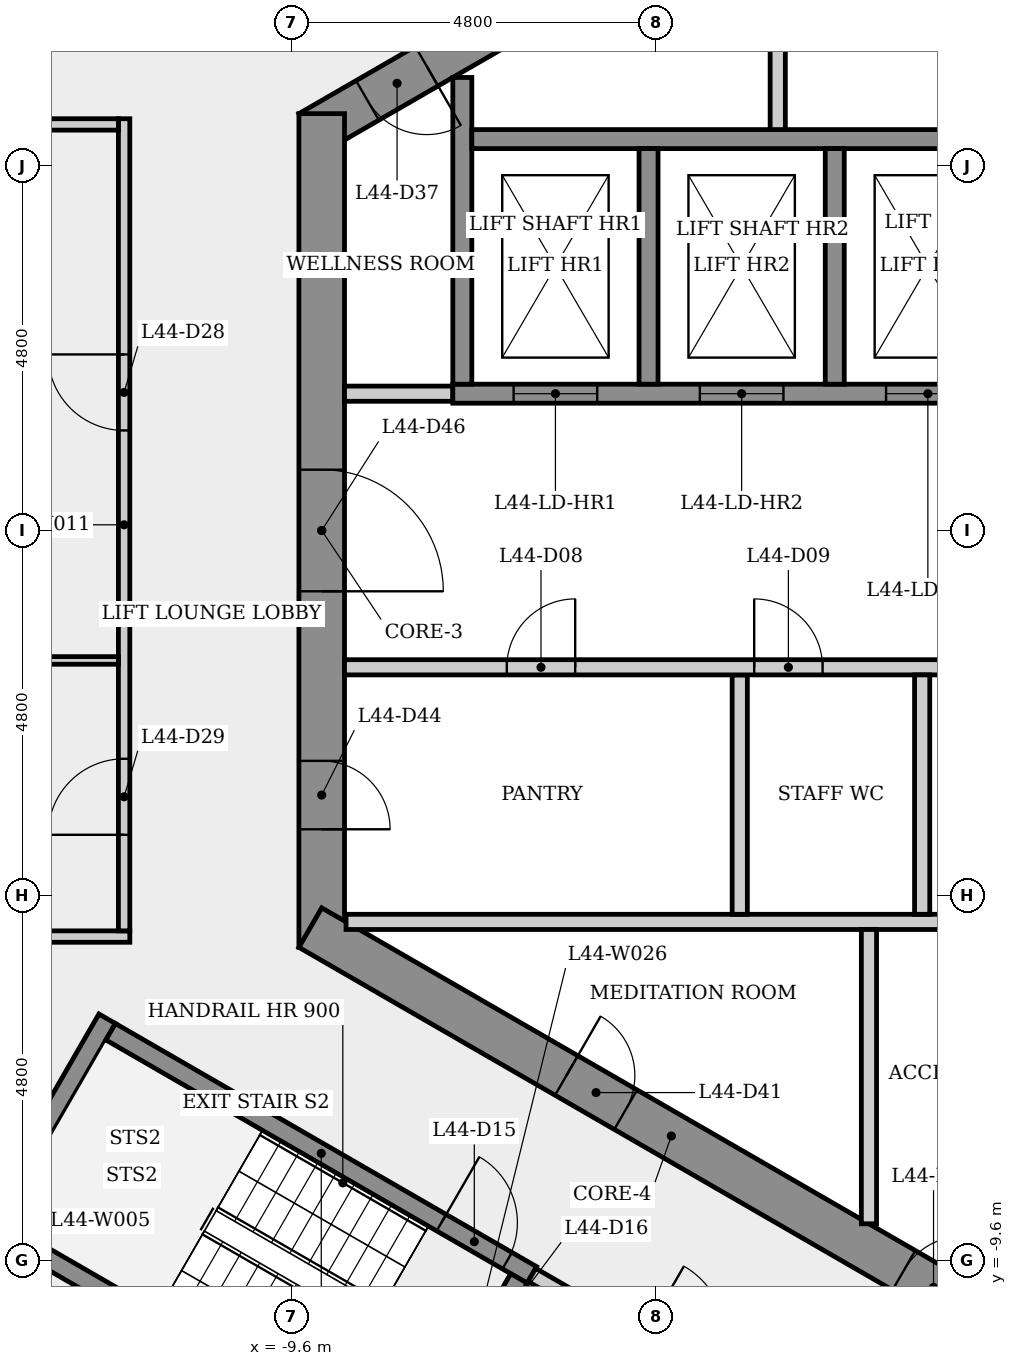
"""IFC4 building model, lengths in metres.
Left out: names, types, materials, properties, quantities, classifications, styles, units other than length and angle.
Written with IfcOpenShell. Run it as: python <this file> out.ifc"""

import sys

from ifc_helpers import new_model, si_unit, direction, frame, frame_2d, origin, place, context, subcontext, project, spatial, rectangle, extrude, element, fill, save


model = new_model("IFC4")
c1 = context("Model", 3, precision=1e-05, world=origin(), true_north=direction((0.0, 1.0)))
c2 = subcontext(c1, "Body", "Model", "MODEL_VIEW")
j1 = project(units=[si_unit("LENGTHUNIT", "METRE"), si_unit("PLANEANGLEUNIT", "RADIAN")], contexts=[c1])
p1 = place(None, origin())
s1 = spatial("IfcSite", under=j1, at=p1, CompositionType="ELEMENT")
p2 = place(p1, origin())
s2 = spatial("IfcBuilding", under=s1, at=p2, CompositionType="ELEMENT")
p3 = place(p2, frame((0.0, 0.0, 166.3)))
s3 = spatial("IfcBuildingStorey", under=s2, at=p3, CompositionType="ELEMENT", Elevation=166.3)
p4 = place(p3, frame((0.15, 10.71, 0.0), z_axis=(0.0, 0.0, 1.0), x_axis=(-0.866023993627, -0.500002442456, 0.0)))
e1 = element("IfcWall", 1, at=p4, inside=s3, PredefinedType="SHEAR", context=c2, shape_type="SweptSolid", body=[
    extrude(rectangle(XDim=10.97, YDim=0.6, at=frame_2d((5.485, 0.0))), origin(), (0.0, 0.0, 1.0), 3.4),
])
p5 = place(p4, frame((9.201, 0.0, 0.0)))
e2 = element("IfcOpeningElement", 2, at=p5, cuts=e1, PredefinedType="OPENING", context=c2, shape_type="SweptSolid", body=[
    extrude(rectangle(XDim=0.9, YDim=2.1, at=frame_2d((0.45, 1.05))), frame((0.0, 0.31, 0.0), z_axis=(0.0, -1.0, 0.0), x_axis=(1.0, 0.0, 0.0)), (0.0, 0.0, 1.0), 0.62),
])
p6 = place(p4, frame((1.744, 0.0, 0.0)))
e3 = element("IfcOpeningElement", 3, at=p6, cuts=e1, PredefinedType="OPENING", context=c2, shape_type="SweptSolid", body=[
    extrude(rectangle(XDim=0.9, YDim=2.1, at=frame_2d((0.45, 1.05))), frame((0.0, 0.31, 0.0), z_axis=(0.0, -1.0, 0.0), x_axis=(1.0, 0.0, 0.0)), (0.0, 0.0, 1.0), 0.62),
])
p7 = place(p3, frame((-9.2, 5.485, 0.0), z_axis=(0.0, 0.0, 1.0), x_axis=(0.0, -1.0, 0.0)))
e4 = element("IfcWall", 4, at=p7, inside=s3, PredefinedType="SHEAR", context=c2, shape_type="SweptSolid", body=[
    extrude(rectangle(XDim=10.97, YDim=0.6, at=frame_2d((5.485, 0.0))), origin(), (0.0, 0.0, 1.0), 3.4),
])
p8 = place(p7, frame((8.516, 0.0, 0.0)))
e5 = element("IfcOpeningElement", 5, at=p8, cuts=e4, PredefinedType="OPENING", context=c2, shape_type="SweptSolid", body=[
    extrude(rectangle(XDim=0.9, YDim=2.1, at=frame_2d((0.45, 1.05))), frame((0.0, 0.31, 0.0), z_axis=(0.0, -1.0, 0.0), x_axis=(1.0, 0.0, 0.0)), (0.0, 0.0, 1.0), 0.62),
])
p9 = place(p7, frame((4.685, 0.0, 0.0)))
e6 = element("IfcOpeningElement", 6, at=p9, cuts=e4, PredefinedType="OPENING", context=c2, shape_type="SweptSolid", body=[
    extrude(rectangle(XDim=1.6, YDim=2.1, at=frame_2d((0.8, 1.05))), frame((0.0, 0.31, 0.0), z_axis=(0.0, -1.0, 0.0), x_axis=(1.0, 0.0, 0.0)), (0.0, 0.0, 1.0), 0.62),
])
p10 = place(p3, frame((-9.35, -5.225, 0.0), z_axis=(0.0, 0.0, 1.0), x_axis=(0.866023993627, -0.500002442456, 0.0)))
e7 = element("IfcWall", 7, at=p10, inside=s3, PredefinedType="SHEAR", context=c2, shape_type="SweptSolid", body=[
    extrude(rectangle(XDim=10.97, YDim=0.6, at=frame_2d((5.485, 0.0))), origin(), (0.0, 0.0, 1.0), 3.4),
])
p11 = place(p10, frame((3.891, 0.0, 0.0)))
e8 = element("IfcOpeningElement", 8, at=p11, cuts=e7, PredefinedType="OPENING", context=c2, shape_type="SweptSolid", body=[
    extrude(rectangle(XDim=0.9, YDim=2.1, at=frame_2d((0.45, 1.05))), frame((0.0, 0.31, 0.0), z_axis=(0.0, -1.0, 0.0), x_axis=(1.0, 0.0, 0.0)), (0.0, 0.0, 1.0), 0.62),
])
p12 = place(p10, frame((9.018, 0.0, 0.0)))
e9 = element("IfcOpeningElement", 9, at=p12, cuts=e7, PredefinedType="OPENING", context=c2, shape_type="SweptSolid", body=[
    extrude(rectangle(XDim=0.9, YDim=2.1, at=frame_2d((0.45, 1.05))), frame((0.0, 0.31, 0.0), z_axis=(0.0, -1.0, 0.0), x_axis=(1.0, 0.0, 0.0)), (0.0, 0.0, 1.0), 0.62),
])
p13 = place(p3, frame((-15.657, 5.278, 0.0), z_axis=(0.0, 0.0, 1.0), x_axis=(0.499988676607, 0.86603194125, 0.0)))
e10 = element("IfcWall", 10, at=p13, inside=s3, PredefinedType="PARTITIONING", context=c2, shape_type="SweptSolid", body=[
    extrude(rectangle(XDim=6.801, YDim=0.15, at=frame_2d((3.4, 0.0))), origin(), (0.0, 0.0, 1.0), 3.05),
])
p14 = place(p13, frame((2.9, 0.0, 0.0)))
e11 = element("IfcOpeningElement", 11, at=p14, cuts=e10, PredefinedType="OPENING", context=c2, shape_type="SweptSolid", body=[
    extrude(rectangle(XDim=1.0, YDim=2.1, at=frame_2d((0.5, 1.05))), frame((0.0, 0.085, 0.0), z_axis=(0.0, -1.0, 0.0), x_axis=(1.0, 0.0, 0.0)), (0.0, 0.0, 1.0), 0.17),
])
p15 = place(p3, frame((-15.695, -5.343, 0.0), z_axis=(0.0, 0.0, 1.0), x_axis=(1.0, 0.0, 0.0)))
e12 = element("IfcWall", 12, at=p15, inside=s3, PredefinedType="PARTITIONING", context=c2, shape_type="SweptSolid", body=[
    extrude(rectangle(XDim=3.97, YDim=0.15, at=frame_2d((1.985, 0.0))), origin(), (0.0, 0.0, 1.0), 3.05),
])
p16 = place(p3, frame((-13.648, -9.239, 0.0), z_axis=(0.0, 0.0, 1.0), x_axis=(0.500017246033, 0.866015446554, 0.0)))
e13 = element("IfcWall", 13, at=p16, inside=s3, PredefinedType="SHEAR", context=c2, shape_type="SweptSolid", body=[
    extrude(rectangle(XDim=3.25, YDim=0.25, at=frame_2d((1.625, 0.0))), origin(), (0.0, 0.0, 1.0), 3.05),
])
p17 = place(p3, frame((-11.977, -6.595, 0.0), z_axis=(0.0, 0.0, 1.0), x_axis=(0.866025499775, -0.499999833739, 0.0)))
e14 = element("IfcWall", 14, at=p17, inside=s3, PredefinedType="SHEAR", context=c2, shape_type="SweptSolid", body=[
    extrude(rectangle(XDim=6.4, YDim=0.25, at=frame_2d((3.2, 0.0))), origin(), (0.0, 0.0, 1.0), 3.05),
])
p18 = place(p17, frame((5.025, 0.0, 0.0)))
e15 = element("IfcOpeningElement", 15, at=p18, cuts=e14, PredefinedType="OPENING", context=c2, shape_type="SweptSolid", body=[
    extrude(rectangle(XDim=1.0, YDim=2.1, at=frame_2d((0.5, 1.05))), frame((0.0, 0.135, 0.0), z_axis=(0.0, -1.0, 0.0), x_axis=(1.0, 0.0, 0.0)), (0.0, 0.0, 1.0), 0.27),
])
p19 = place(p3, frame((-11.8, -5.268, 0.0), z_axis=(0.0, 0.0, 1.0), x_axis=(0.0, 1.0, 0.0)))
e16 = element("IfcWall", 16, at=p19, inside=s3, PredefinedType="PARTITIONING", context=c2, shape_type="SweptSolid", body=[
    extrude(rectangle(XDim=10.686, YDim=0.15, at=frame_2d((5.343, 0.0))), origin(), (0.0, 0.0, 1.0), 3.05),
])
p20 = place(p19, frame((6.585, 0.0, 0.0)))
e17 = element("IfcOpeningElement", 17, at=p20, cuts=e16, PredefinedType="OPENING", context=c2, shape_type="SweptSolid", body=[
    extrude(rectangle(XDim=1.0, YDim=2.1, at=frame_2d((0.5, 1.05))), frame((0.0, 0.085, 0.0), z_axis=(0.0, -1.0, 0.0), x_axis=(1.0, 0.0, 0.0)), (0.0, 0.0, 1.0), 0.17),
])
p21 = place(p19, frame((1.264, 0.0, 0.0)))
e18 = element("IfcOpeningElement", 18, at=p21, cuts=e16, PredefinedType="OPENING", context=c2, shape_type="SweptSolid", body=[
    extrude(rectangle(XDim=1.0, YDim=2.1, at=frame_2d((0.5, 1.05))), frame((0.0, 0.085, 0.0), z_axis=(0.0, -1.0, 0.0), x_axis=(1.0, 0.0, 0.0)), (0.0, 0.0, 1.0), 0.17),
])
p22 = place(p3, frame((-11.875, -1.71, 0.0), z_axis=(0.0, 0.0, 1.0), x_axis=(-1.0, 0.0, 0.0)))
e19 = element("IfcWall", 19, at=p22, inside=s3, PredefinedType="PARTITIONING", context=c2, shape_type="SweptSolid", body=[
    extrude(rectangle(XDim=6.074, YDim=0.1, at=frame_2d((3.037, 0.0))), origin(), (0.0, 0.0, 1.0), 3.05),
])
p23 = place(p3, frame((-11.875, 5.343, 0.0), z_axis=(0.0, 0.0, 1.0), x_axis=(-1.0, 0.0, 0.0)))
e20 = element("IfcWall", 20, at=p23, inside=s3, PredefinedType="PARTITIONING", context=c2, shape_type="SweptSolid", body=[
    extrude(rectangle(XDim=3.67, YDim=0.15, at=frame_2d((1.835, 0.0))), origin(), (0.0, 0.0, 1.0), 3.05),
])
p24 = place(p3, frame((-8.9, 1.8, 0.0), z_axis=(0.0, 0.0, 1.0), x_axis=(1.0, 0.0, 0.0)))
e21 = element("IfcWall", 21, at=p24, inside=s3, PredefinedType="PARTITIONING", context=c2, shape_type="SweptSolid", body=[
    extrude(rectangle(XDim=1.425, YDim=0.2, at=frame_2d((0.712, 0.0))), origin(), (0.0, 0.0, 1.0), 3.05),
])
p25 = place(p3, frame((-8.88, -5.15, 0.0), z_axis=(0.0, 0.0, 1.0), x_axis=(1.0, 0.0, 0.0)))
e22 = element("IfcWall", 22, at=p25, inside=s3, PredefinedType="PARTITIONING", context=c2, shape_type="SweptSolid", body=[
    extrude(rectangle(XDim=11.205, YDim=0.2, at=frame_2d((5.603, 0.0))), origin(), (0.0, 0.0, 1.0), 3.05),
])
p26 = place(p3, frame((-7.935, -12.393, 0.0), z_axis=(0.0, 0.0, 1.0), x_axis=(-0.866025499775, 0.499999833739, 0.0)))
e23 = element("IfcWall", 23, at=p26, inside=s3, PredefinedType="SHEAR", context=c2, shape_type="SweptSolid", body=[
    extrude(rectangle(XDim=6.4, YDim=0.25, at=frame_2d((3.2, 0.0))), origin(), (0.0, 0.0, 1.0), 3.05),
])
p27 = place(p3, frame((-7.475, 1.8, 0.0), z_axis=(0.0, 0.0, 1.0), x_axis=(1.0, 0.0, 0.0)))
e24 = element("IfcWall", 24, at=p27, inside=s3, PredefinedType="SHEAR", context=c2, shape_type="SweptSolid", body=[
    extrude(rectangle(XDim=14.95, YDim=0.25, at=frame_2d((7.475, 0.0))), origin(), (0.0, 0.0, 1.0), 3.05),
])
p28 = place(p27, frame((0.8, 0.0, 0.0)))
e25 = element("IfcOpeningElement", 25, at=p28, cuts=e24, PredefinedType="OPENING", context=c2, shape_type="SweptSolid", body=[
    extrude(rectangle(XDim=1.1, YDim=2.1, at=frame_2d((0.55, 1.05))), frame((0.0, 0.135, 0.0), z_axis=(0.0, -1.0, 0.0), x_axis=(1.0, 0.0, 0.0)), (0.0, 0.0, 1.0), 0.27),
])
p29 = place(p27, frame((3.25, 0.0, 0.0)))
e26 = element("IfcOpeningElement", 26, at=p29, cuts=e24, PredefinedType="OPENING", context=c2, shape_type="SweptSolid", body=[
    extrude(rectangle(XDim=1.1, YDim=2.1, at=frame_2d((0.55, 1.05))), frame((0.0, 0.135, 0.0), z_axis=(0.0, -1.0, 0.0), x_axis=(1.0, 0.0, 0.0)), (0.0, 0.0, 1.0), 0.27),
])
p30 = place(p27, frame((5.7, 0.0, 0.0)))
e27 = element("IfcOpeningElement", 27, at=p30, cuts=e24, PredefinedType="OPENING", context=c2, shape_type="SweptSolid", body=[
    extrude(rectangle(XDim=1.1, YDim=2.1, at=frame_2d((0.55, 1.05))), frame((0.0, 0.135, 0.0), z_axis=(0.0, -1.0, 0.0), x_axis=(1.0, 0.0, 0.0)), (0.0, 0.0, 1.0), 0.27),
])
p31 = place(p27, frame((8.15, 0.0, 0.0)))
e28 = element("IfcOpeningElement", 28, at=p31, cuts=e24, PredefinedType="OPENING", context=c2, shape_type="SweptSolid", body=[
    extrude(rectangle(XDim=1.1, YDim=2.1, at=frame_2d((0.55, 1.05))), frame((0.0, 0.135, 0.0), z_axis=(0.0, -1.0, 0.0), x_axis=(1.0, 0.0, 0.0)), (0.0, 0.0, 1.0), 0.27),
])
p32 = place(p27, frame((10.6, 0.0, 0.0)))
e29 = element("IfcOpeningElement", 29, at=p32, cuts=e24, PredefinedType="OPENING", context=c2, shape_type="SweptSolid", body=[
    extrude(rectangle(XDim=1.1, YDim=2.1, at=frame_2d((0.55, 1.05))), frame((0.0, 0.135, 0.0), z_axis=(0.0, -1.0, 0.0), x_axis=(1.0, 0.0, 0.0)), (0.0, 0.0, 1.0), 0.27),
])
p33 = place(p27, frame((13.05, 0.0, 0.0)))
e30 = element("IfcOpeningElement", 30, at=p33, cuts=e24, PredefinedType="OPENING", context=c2, shape_type="SweptSolid", body=[
    extrude(rectangle(XDim=1.1, YDim=2.1, at=frame_2d((0.55, 1.05))), frame((0.0, 0.135, 0.0), z_axis=(0.0, -1.0, 0.0), x_axis=(1.0, 0.0, 0.0)), (0.0, 0.0, 1.0), 0.27),
])
p34 = place(p3, frame((-7.35, 1.925, 0.0), z_axis=(0.0, 0.0, 1.0), x_axis=(0.0, 1.0, 0.0)))
e31 = element("IfcWall", 31, at=p34, inside=s3, PredefinedType="SHEAR", context=c2, shape_type="SweptSolid", body=[
    extrude(rectangle(XDim=4.036, YDim=0.25, at=frame_2d((2.018, 0.0))), origin(), (0.0, 0.0, 1.0), 3.05),
])
p35 = place(p3, frame((-7.225, 5.15, 0.0), z_axis=(0.0, 0.0, 1.0), x_axis=(1.0, 0.0, 0.0)))
e32 = element("IfcWall", 32, at=p35, inside=s3, PredefinedType="SHEAR", context=c2, shape_type="SweptSolid", body=[
    extrude(rectangle(XDim=14.7, YDim=0.25, at=frame_2d((7.35, 0.0))), origin(), (0.0, 0.0, 1.0), 3.05),
])
p36 = place(p3, frame((-6.605, -9.841, 0.0), z_axis=(0.0, 0.0, 1.0), x_axis=(-0.499996545922, -0.866027397988, 0.0)))
e33 = element("IfcWall", 33, at=p36, inside=s3, PredefinedType="SHEAR", context=c2, shape_type="SweptSolid", body=[
    extrude(rectangle(XDim=2.75, YDim=0.25, at=frame_2d((1.375, 0.0))), origin(), (0.0, 0.0, 1.0), 3.05),
])
p37 = place(p36, frame((0.875, 0.0, 0.0)))
e34 = element("IfcOpeningElement", 34, at=p37, cuts=e33, PredefinedType="OPENING", context=c2, shape_type="SweptSolid", body=[
    extrude(rectangle(XDim=1.0, YDim=2.1, at=frame_2d((0.5, 1.05))), frame((0.0, 0.135, 0.0), z_axis=(0.0, -1.0, 0.0), x_axis=(1.0, 0.0, 0.0)), (0.0, 0.0, 1.0), 0.27),
])
p38 = place(p3, frame((-6.435, -9.795, 0.0), z_axis=(0.0, 0.0, 1.0), x_axis=(0.866012907634, -0.500021643343, 0.0)))
e35 = element("IfcWall", 35, at=p38, inside=s3, PredefinedType="PARTITIONING", context=c2, shape_type="SweptSolid", body=[
    extrude(rectangle(XDim=4.45, YDim=0.2, at=frame_2d((2.225, 0.0))), origin(), (0.0, 0.0, 1.0), 3.05),
])
p39 = place(p38, frame((1.675, 0.0, 0.0)))
e36 = element("IfcOpeningElement", 36, at=p39, cuts=e35, PredefinedType="OPENING", context=c2, shape_type="SweptSolid", body=[
    extrude(rectangle(XDim=1.1, YDim=2.1, at=frame_2d((0.55, 1.05))), frame((0.0, 0.11, 0.0), z_axis=(0.0, -1.0, 0.0), x_axis=(1.0, 0.0, 0.0)), (0.0, 0.0, 1.0), 0.22),
])
p40 = place(p3, frame((-4.9, 5.025, 0.0), z_axis=(0.0, 0.0, 1.0), x_axis=(0.0, -1.0, 0.0)))
e37 = element("IfcWall", 37, at=p40, inside=s3, PredefinedType="SHEAR", context=c2, shape_type="SweptSolid", body=[
    extrude(rectangle(XDim=3.1, YDim=0.25, at=frame_2d((1.55, 0.0))), origin(), (0.0, 0.0, 1.0), 3.4),
])
p41 = place(p3, frame((-3.7, -1.9, 0.0), z_axis=(0.0, 0.0, 1.0), x_axis=(0.0, -1.0, 0.0)))
e38 = element("IfcWall", 38, at=p41, inside=s3, PredefinedType="PARTITIONING", context=c2, shape_type="SweptSolid", body=[
    extrude(rectangle(XDim=3.15, YDim=0.2, at=frame_2d((1.575, 0.0))), origin(), (0.0, 0.0, 1.0), 3.05),
])
p42 = place(p3, frame((-8.9, -1.8, 0.0), z_axis=(0.0, 0.0, 1.0), x_axis=(1.0, 0.0, 0.0)))
e39 = element("IfcWall", 39, at=p42, inside=s3, PredefinedType="PARTITIONING", context=c2, shape_type="SweptSolid", body=[
    extrude(rectangle(XDim=11.225, YDim=0.2, at=frame_2d((5.613, 0.0))), origin(), (0.0, 0.0, 1.0), 3.05),
])
p43 = place(p42, frame((2.135, 0.0, 0.0)))
e40 = element("IfcOpeningElement", 40, at=p43, cuts=e39, PredefinedType="OPENING", context=c2, shape_type="SweptSolid", body=[
    extrude(rectangle(XDim=0.9, YDim=2.1, at=frame_2d((0.45, 1.05))), frame((0.0, 0.11, 0.0), z_axis=(0.0, -1.0, 0.0), x_axis=(1.0, 0.0, 0.0)), (0.0, 0.0, 1.0), 0.22),
])
p44 = place(p42, frame((5.39, 0.0, 0.0)))
e41 = element("IfcOpeningElement", 41, at=p44, cuts=e39, PredefinedType="OPENING", context=c2, shape_type="SweptSolid", body=[
    extrude(rectangle(XDim=0.9, YDim=2.1, at=frame_2d((0.45, 1.05))), frame((0.0, 0.11, 0.0), z_axis=(0.0, -1.0, 0.0), x_axis=(1.0, 0.0, 0.0)), (0.0, 0.0, 1.0), 0.22),
])
p45 = place(p42, frame((9.613, 0.0, 0.0)))
e42 = element("IfcOpeningElement", 42, at=p45, cuts=e39, PredefinedType="OPENING", context=c2, shape_type="SweptSolid", body=[
    extrude(rectangle(XDim=0.9, YDim=2.1, at=frame_2d((0.45, 1.05))), frame((0.0, 0.11, 0.0), z_axis=(0.0, -1.0, 0.0), x_axis=(1.0, 0.0, 0.0)), (0.0, 0.0, 1.0), 0.22),
])
p46 = place(p3, frame((-3.2, 8.429, 0.0), z_axis=(0.0, 0.0, 1.0), x_axis=(0.0, -1.0, 0.0)))
e43 = element("IfcWall", 43, at=p46, inside=s3, PredefinedType="PARTITIONING", context=c2, shape_type="SweptSolid", body=[
    extrude(rectangle(XDim=3.154, YDim=0.2, at=frame_2d((1.577, 0.0))), origin(), (0.0, 0.0, 1.0), 3.05),
])
p47 = place(p3, frame((-2.45, 5.025, 0.0), z_axis=(0.0, 0.0, 1.0), x_axis=(0.0, -1.0, 0.0)))
e44 = element("IfcWall", 44, at=p47, inside=s3, PredefinedType="SHEAR", context=c2, shape_type="SweptSolid", body=[
    extrude(rectangle(XDim=3.1, YDim=0.25, at=frame_2d((1.55, 0.0))), origin(), (0.0, 0.0, 1.0), 3.4),
])
p48 = place(p3, frame((-2.0, -5.25, 0.0), z_axis=(0.0, 0.0, 1.0), x_axis=(0.0, -1.0, 0.0)))
e45 = element("IfcWall", 45, at=p48, inside=s3, PredefinedType="PARTITIONING", context=c2, shape_type="SweptSolid", body=[
    extrude(rectangle(XDim=3.872, YDim=0.2, at=frame_2d((1.936, 0.0))), origin(), (0.0, 0.0, 1.0), 3.05),
])
p49 = place(p3, frame((-1.3, -1.9, 0.0), z_axis=(0.0, 0.0, 1.0), x_axis=(0.0, -1.0, 0.0)))
e46 = element("IfcWall", 46, at=p49, inside=s3, PredefinedType="PARTITIONING", context=c2, shape_type="SweptSolid", body=[
    extrude(rectangle(XDim=3.15, YDim=0.2, at=frame_2d((1.575, 0.0))), origin(), (0.0, 0.0, 1.0), 3.05),
])
p50 = place(p28, origin())
e47 = element("IfcDoor", 47, at=p50, inside=s3, OperationType="SLIDING_TO_LEFT", PredefinedType="DOOR", context=c2, shape_type="SweptSolid", body=[
    extrude(rectangle(XDim=1.1, YDim=2.1, at=frame_2d((0.55, 1.05))), frame((0.0, 0.025, 0.0), z_axis=(0.0, -1.0, 0.0), x_axis=(1.0, 0.0, 0.0)), (0.0, 0.0, 1.0), 0.05),
])
fill(e25, e47)
p51 = place(p29, origin())
e48 = element("IfcDoor", 48, at=p51, inside=s3, OperationType="SLIDING_TO_LEFT", PredefinedType="DOOR", context=c2, shape_type="SweptSolid", body=[
    extrude(rectangle(XDim=1.1, YDim=2.1, at=frame_2d((0.55, 1.05))), frame((0.0, 0.025, 0.0), z_axis=(0.0, -1.0, 0.0), x_axis=(1.0, 0.0, 0.0)), (0.0, 0.0, 1.0), 0.05),
])
fill(e26, e48)
p52 = place(p30, origin())
e49 = element("IfcDoor", 49, at=p52, inside=s3, OperationType="SLIDING_TO_LEFT", PredefinedType="DOOR", context=c2, shape_type="SweptSolid", body=[
    extrude(rectangle(XDim=1.1, YDim=2.1, at=frame_2d((0.55, 1.05))), frame((0.0, 0.025, 0.0), z_axis=(0.0, -1.0, 0.0), x_axis=(1.0, 0.0, 0.0)), (0.0, 0.0, 1.0), 0.05),
])
fill(e27, e49)
p53 = place(p43, origin())
e50 = element("IfcDoor", 50, at=p53, inside=s3, OperationType="SINGLE_SWING_RIGHT", PredefinedType="DOOR", context=c2, shape_type="SweptSolid", body=[
    extrude(rectangle(XDim=0.9, YDim=2.1, at=frame_2d((0.45, 1.05))), frame((0.0, 0.025, 0.0), z_axis=(0.0, -1.0, 0.0), x_axis=(1.0, 0.0, 0.0)), (0.0, 0.0, 1.0), 0.05),
])
fill(e40, e50)
p54 = place(p44, origin())
e51 = element("IfcDoor", 51, at=p54, inside=s3, OperationType="SINGLE_SWING_LEFT", PredefinedType="DOOR", context=c2, shape_type="SweptSolid", body=[
    extrude(rectangle(XDim=0.9, YDim=2.1, at=frame_2d((0.45, 1.05))), frame((0.0, 0.025, 0.0), z_axis=(0.0, -1.0, 0.0), x_axis=(1.0, 0.0, 0.0)), (0.0, 0.0, 1.0), 0.05),
])
fill(e41, e51)
p55 = place(p18, origin())
e52 = element("IfcDoor", 52, at=p55, inside=s3, OperationType="SINGLE_SWING_LEFT", PredefinedType="DOOR", context=c2, shape_type="SweptSolid", body=[
    extrude(rectangle(XDim=1.0, YDim=2.1, at=frame_2d((0.5, 1.05))), frame((0.0, 0.025, 0.0), z_axis=(0.0, -1.0, 0.0), x_axis=(1.0, 0.0, 0.0)), (0.0, 0.0, 1.0), 0.05),
])
fill(e15, e52)
p56 = place(p20, origin())
e53 = element("IfcDoor", 53, at=p56, inside=s3, OperationType="SINGLE_SWING_RIGHT", PredefinedType="DOOR", context=c2, shape_type="SweptSolid", body=[
    extrude(rectangle(XDim=1.0, YDim=2.1, at=frame_2d((0.5, 1.05))), frame((0.0, 0.025, 0.0), z_axis=(0.0, -1.0, 0.0), x_axis=(1.0, 0.0, 0.0)), (0.0, 0.0, 1.0), 0.05),
])
fill(e17, e53)
p57 = place(p21, origin())
e54 = element("IfcDoor", 54, at=p57, inside=s3, OperationType="SINGLE_SWING_LEFT", PredefinedType="DOOR", context=c2, shape_type="SweptSolid", body=[
    extrude(rectangle(XDim=1.0, YDim=2.1, at=frame_2d((0.5, 1.05))), frame((0.0, 0.025, 0.0), z_axis=(0.0, -1.0, 0.0), x_axis=(1.0, 0.0, 0.0)), (0.0, 0.0, 1.0), 0.05),
])
fill(e18, e54)
p58 = place(p5, origin())
e55 = element("IfcDoor", 55, at=p58, inside=s3, OperationType="SINGLE_SWING_LEFT", PredefinedType="DOOR", context=c2, shape_type="SweptSolid", body=[
    extrude(rectangle(XDim=0.9, YDim=2.1, at=frame_2d((0.45, 1.05))), frame((0.0, 0.025, 0.0), z_axis=(0.0, -1.0, 0.0), x_axis=(1.0, 0.0, 0.0)), (0.0, 0.0, 1.0), 0.05),
])
fill(e2, e55)
p59 = place(p11, origin())
e56 = element("IfcDoor", 56, at=p59, inside=s3, OperationType="SINGLE_SWING_LEFT", PredefinedType="DOOR", context=c2, shape_type="SweptSolid", body=[
    extrude(rectangle(XDim=0.9, YDim=2.1, at=frame_2d((0.45, 1.05))), frame((0.0, 0.025, 0.0), z_axis=(0.0, -1.0, 0.0), x_axis=(1.0, 0.0, 0.0)), (0.0, 0.0, 1.0), 0.05),
])
fill(e8, e56)
p60 = place(p12, origin())
e57 = element("IfcDoor", 57, at=p60, inside=s3, OperationType="SINGLE_SWING_RIGHT", PredefinedType="DOOR", context=c2, shape_type="SweptSolid", body=[
    extrude(rectangle(XDim=0.9, YDim=2.1, at=frame_2d((0.45, 1.05))), frame((0.0, 0.025, 0.0), z_axis=(0.0, -1.0, 0.0), x_axis=(1.0, 0.0, 0.0)), (0.0, 0.0, 1.0), 0.05),
])
fill(e9, e57)
p61 = place(p8, origin())
e58 = element("IfcDoor", 58, at=p61, inside=s3, OperationType="SINGLE_SWING_RIGHT", PredefinedType="DOOR", context=c2, shape_type="SweptSolid", body=[
    extrude(rectangle(XDim=0.9, YDim=2.1, at=frame_2d((0.45, 1.05))), frame((0.0, 0.025, 0.0), z_axis=(0.0, -1.0, 0.0), x_axis=(1.0, 0.0, 0.0)), (0.0, 0.0, 1.0), 0.05),
])
fill(e5, e58)
p62 = place(p9, origin())
e59 = element("IfcDoor", 59, at=p62, inside=s3, OperationType="SINGLE_SWING_RIGHT", PredefinedType="DOOR", context=c2, shape_type="SweptSolid", body=[
    extrude(rectangle(XDim=1.6, YDim=2.1, at=frame_2d((0.8, 1.05))), frame((0.0, 0.025, 0.0), z_axis=(0.0, -1.0, 0.0), x_axis=(1.0, 0.0, 0.0)), (0.0, 0.0, 1.0), 0.05),
])
fill(e6, e59)
save(model, sys.argv[1])
